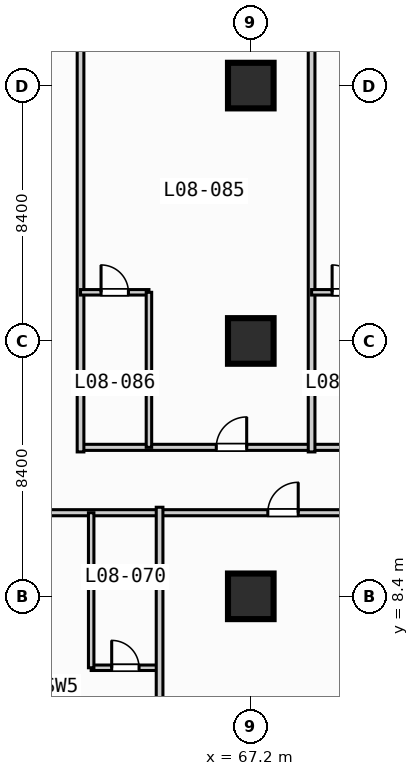
"""IFC4 building model, lengths in metres.
Left out: names, types, materials, properties, quantities, classifications, styles, units other than length and angle.
Written with IfcOpenShell. Run it as: python <this file> out.ifc"""

import sys

from ifc_helpers import new_model, si_unit, direction, frame, frame_2d, origin, origin_2d, place, context, subcontext, project, spatial, rectangle, extrude, element, fill, save


model = new_model("IFC4")
c1 = context("Model", 3, precision=1e-05, world=origin(), true_north=direction((0.0, 1.0)))
c2 = subcontext(c1, "Body", "Model", "MODEL_VIEW")
j1 = project(units=[si_unit("LENGTHUNIT", "METRE"), si_unit("PLANEANGLEUNIT", "RADIAN")], contexts=[c1])
p1 = place(None, origin())
s1 = spatial("IfcSite", under=j1, at=p1, CompositionType="ELEMENT")
p2 = place(p1, origin())
s2 = spatial("IfcBuilding", under=s1, at=p2, CompositionType="ELEMENT")
p3 = place(p2, frame((0.0, 0.0, 39.6)))
s3 = spatial("IfcBuildingStorey", under=s2, at=p3, CompositionType="ELEMENT", Elevation=39.6)
for number, where, z_axis, x_axis in (
    (1, (67.2, 8.4, 0.0), (0.0, 0.0, 1.0), (1.0, 0.0, 0.0)),
    (2, (67.2, 16.8, 0.0), (0.0, 0.0, 1.0), (1.0, 0.0, 0.0)),
    (3, (67.2, 25.2, 0.0), (0.0, 0.0, 1.0), (1.0, 0.0, 0.0)),
):
    element("IfcColumn", number, at=place(p3, frame(where, z_axis=z_axis, x_axis=x_axis)), inside=s3, PredefinedType="COLUMN", context=c2, shape_type="SweptSolid", body=[
        extrude(rectangle(XDim=1.5, YDim=1.5, at=origin_2d()), origin(), (0.0, 0.0, 1.0), 3.8),
    ])
p4 = place(p3, frame((13.4, 11.15, 0.0), z_axis=(0.0, 0.0, 1.0), x_axis=(1.0, 0.0, 0.0)))
e4 = element("IfcWall", 4, at=p4, inside=s3, PredefinedType="PARTITIONING", context=c2, shape_type="SweptSolid", body=[
    extrude(rectangle(XDim=75.4, YDim=0.2, at=frame_2d((37.7, 0.0))), origin(), (0.0, 0.0, 1.0), 3.55),
])
p5 = place(p4, frame((6.065, 0.0, 0.0)))
e5 = element("IfcOpeningElement", 5, at=p5, cuts=e4, PredefinedType="OPENING", context=c2, shape_type="SweptSolid", body=[
    extrude(rectangle(XDim=1.0, YDim=2.15, at=frame_2d((0.5, 1.075))), frame((0.0, 0.11, 0.0), z_axis=(0.0, -1.0, 0.0), x_axis=(1.0, 0.0, 0.0)), (0.0, 0.0, 1.0), 0.22),
])
p6 = place(p4, frame((13.36, 0.0, 0.0)))
e6 = element("IfcOpeningElement", 6, at=p6, cuts=e4, PredefinedType="OPENING", context=c2, shape_type="SweptSolid", body=[
    extrude(rectangle(XDim=1.0, YDim=2.15, at=frame_2d((0.5, 1.075))), frame((0.0, 0.11, 0.0), z_axis=(0.0, -1.0, 0.0), x_axis=(1.0, 0.0, 0.0)), (0.0, 0.0, 1.0), 0.22),
])
p7 = place(p4, frame((21.785, 0.0, 0.0)))
e7 = element("IfcOpeningElement", 7, at=p7, cuts=e4, PredefinedType="OPENING", context=c2, shape_type="SweptSolid", body=[
    extrude(rectangle(XDim=1.0, YDim=2.15, at=frame_2d((0.5, 1.075))), frame((0.0, 0.11, 0.0), z_axis=(0.0, -1.0, 0.0), x_axis=(1.0, 0.0, 0.0)), (0.0, 0.0, 1.0), 0.22),
])
p8 = place(p4, frame((30.185, 0.0, 0.0)))
e8 = element("IfcOpeningElement", 8, at=p8, cuts=e4, PredefinedType="OPENING", context=c2, shape_type="SweptSolid", body=[
    extrude(rectangle(XDim=1.0, YDim=2.15, at=frame_2d((0.5, 1.075))), frame((0.0, 0.11, 0.0), z_axis=(0.0, -1.0, 0.0), x_axis=(1.0, 0.0, 0.0)), (0.0, 0.0, 1.0), 0.22),
])
p9 = place(p4, frame((41.76, 0.0, 0.0)))
e9 = element("IfcOpeningElement", 9, at=p9, cuts=e4, PredefinedType="OPENING", context=c2, shape_type="SweptSolid", body=[
    extrude(rectangle(XDim=1.0, YDim=2.15, at=frame_2d((0.5, 1.075))), frame((0.0, 0.11, 0.0), z_axis=(0.0, -1.0, 0.0), x_axis=(1.0, 0.0, 0.0)), (0.0, 0.0, 1.0), 0.22),
])
p10 = place(p4, frame((54.36, 0.0, 0.0)))
e10 = element("IfcOpeningElement", 10, at=p10, cuts=e4, PredefinedType="OPENING", context=c2, shape_type="SweptSolid", body=[
    extrude(rectangle(XDim=1.0, YDim=2.15, at=frame_2d((0.5, 1.075))), frame((0.0, 0.11, 0.0), z_axis=(0.0, -1.0, 0.0), x_axis=(1.0, 0.0, 0.0)), (0.0, 0.0, 1.0), 0.22),
])
p11 = place(p4, frame((63.785, 0.0, 0.0)))
e11 = element("IfcOpeningElement", 11, at=p11, cuts=e4, PredefinedType="OPENING", context=c2, shape_type="SweptSolid", body=[
    extrude(rectangle(XDim=1.0, YDim=2.15, at=frame_2d((0.5, 1.075))), frame((0.0, 0.11, 0.0), z_axis=(0.0, -1.0, 0.0), x_axis=(1.0, 0.0, 0.0)), (0.0, 0.0, 1.0), 0.22),
])
p12 = place(p4, frame((70.86, 0.0, 0.0)))
e12 = element("IfcOpeningElement", 12, at=p12, cuts=e4, PredefinedType="OPENING", context=c2, shape_type="SweptSolid", body=[
    extrude(rectangle(XDim=1.0, YDim=2.15, at=frame_2d((0.5, 1.075))), frame((0.0, 0.11, 0.0), z_axis=(0.0, -1.0, 0.0), x_axis=(1.0, 0.0, 0.0)), (0.0, 0.0, 1.0), 0.22),
])
p13 = place(p3, frame((61.95, 6.05, 0.0), z_axis=(0.0, 0.0, 1.0), x_axis=(1.0, 0.0, 0.0)))
e13 = element("IfcWall", 13, at=p13, inside=s3, PredefinedType="PLUMBINGWALL", context=c2, shape_type="SweptSolid", body=[
    extrude(rectangle(XDim=2.25, YDim=0.18, at=frame_2d((1.125, 0.0))), origin(), (0.0, 0.0, 1.0), 3.55),
])
p14 = place(p13, frame((0.675, 0.0, 0.0)))
e14 = element("IfcOpeningElement", 14, at=p14, cuts=e13, PredefinedType="OPENING", context=c2, shape_type="SweptSolid", body=[
    extrude(rectangle(XDim=0.9, YDim=2.1, at=frame_2d((0.45, 1.05))), frame((0.0, 0.1, 0.0), z_axis=(0.0, -1.0, 0.0), x_axis=(1.0, 0.0, 0.0)), (0.0, 0.0, 1.0), 0.2),
])
p15 = place(p3, frame((61.95, 6.05, 0.0), z_axis=(0.0, 0.0, 1.0), x_axis=(0.0, 1.0, 0.0)))
e15 = element("IfcWall", 15, at=p15, inside=s3, PredefinedType="PLUMBINGWALL", context=c2, shape_type="SweptSolid", body=[
    extrude(rectangle(XDim=5.1, YDim=0.18, at=frame_2d((2.55, 0.0))), origin(), (0.0, 0.0, 1.0), 3.55),
])
p16 = place(p3, frame((64.2, 0.2, 0.0), z_axis=(0.0, 0.0, 1.0), x_axis=(0.0, 1.0, 0.0)))
e16 = element("IfcWall", 16, at=p16, inside=s3, PredefinedType="PARTITIONING", context=c2, shape_type="SweptSolid", body=[
    extrude(rectangle(XDim=11.13, YDim=0.22, at=frame_2d((5.565, 0.0))), origin(), (0.0, 0.0, 1.0), 3.55),
])
p17 = place(p3, frame((61.6, 13.3, 0.0), z_axis=(0.0, 0.0, 1.0), x_axis=(1.0, 0.0, 0.0)))
e17 = element("IfcWall", 17, at=p17, inside=s3, PredefinedType="PARTITIONING", context=c2, shape_type="SweptSolid", body=[
    extrude(rectangle(XDim=27.2, YDim=0.2, at=frame_2d((13.6, 0.0))), origin(), (0.0, 0.0, 1.0), 3.55),
])
p18 = place(p17, frame((4.465, 0.0, 0.0)))
e18 = element("IfcOpeningElement", 18, at=p18, cuts=e17, PredefinedType="OPENING", context=c2, shape_type="SweptSolid", body=[
    extrude(rectangle(XDim=1.0, YDim=2.15, at=frame_2d((0.5, 1.075))), frame((0.0, 0.11, 0.0), z_axis=(0.0, -1.0, 0.0), x_axis=(1.0, 0.0, 0.0)), (0.0, 0.0, 1.0), 0.22),
])
p19 = place(p17, frame((11.465, 0.0, 0.0)))
e19 = element("IfcOpeningElement", 19, at=p19, cuts=e17, PredefinedType="OPENING", context=c2, shape_type="SweptSolid", body=[
    extrude(rectangle(XDim=1.0, YDim=2.15, at=frame_2d((0.5, 1.075))), frame((0.0, 0.11, 0.0), z_axis=(0.0, -1.0, 0.0), x_axis=(1.0, 0.0, 0.0)), (0.0, 0.0, 1.0), 0.22),
])
p20 = place(p17, frame((15.535, 0.0, 0.0)))
e20 = element("IfcOpeningElement", 20, at=p20, cuts=e17, PredefinedType="OPENING", context=c2, shape_type="SweptSolid", body=[
    extrude(rectangle(XDim=1.0, YDim=2.15, at=frame_2d((0.5, 1.075))), frame((0.0, 0.11, 0.0), z_axis=(0.0, -1.0, 0.0), x_axis=(1.0, 0.0, 0.0)), (0.0, 0.0, 1.0), 0.22),
])
p21 = place(p17, frame((22.135, 0.0, 0.0)))
e21 = element("IfcOpeningElement", 21, at=p21, cuts=e17, PredefinedType="OPENING", context=c2, shape_type="SweptSolid", body=[
    extrude(rectangle(XDim=1.0, YDim=2.15, at=frame_2d((0.5, 1.075))), frame((0.0, 0.11, 0.0), z_axis=(0.0, -1.0, 0.0), x_axis=(1.0, 0.0, 0.0)), (0.0, 0.0, 1.0), 0.22),
])
p22 = place(p3, frame((61.6, 13.15, 0.0), z_axis=(0.0, 0.0, 1.0), x_axis=(0.0, 1.0, 0.0)))
e22 = element("IfcWall", 22, at=p22, inside=s3, PredefinedType="PARTITIONING", context=c2, shape_type="SweptSolid", body=[
    extrude(rectangle(XDim=20.28, YDim=0.22, at=frame_2d((10.14, 0.0))), origin(), (0.0, 0.0, 1.0), 3.55),
])
p23 = place(p3, frame((61.6, 18.4, 0.0), z_axis=(0.0, 0.0, 1.0), x_axis=(1.0, 0.0, 0.0)))
e23 = element("IfcWall", 23, at=p23, inside=s3, PredefinedType="PLUMBINGWALL", context=c2, shape_type="SweptSolid", body=[
    extrude(rectangle(XDim=2.25, YDim=0.18, at=frame_2d((1.125, 0.0))), origin(), (0.0, 0.0, 1.0), 3.55),
])
p24 = place(p23, frame((0.675, 0.0, 0.0)))
e24 = element("IfcOpeningElement", 24, at=p24, cuts=e23, PredefinedType="OPENING", context=c2, shape_type="SweptSolid", body=[
    extrude(rectangle(XDim=0.9, YDim=2.1, at=frame_2d((0.45, 1.05))), frame((0.0, 0.1, 0.0), z_axis=(0.0, -1.0, 0.0), x_axis=(1.0, 0.0, 0.0)), (0.0, 0.0, 1.0), 0.2),
])
p25 = place(p3, frame((63.85, 13.3, 0.0), z_axis=(0.0, 0.0, 1.0), x_axis=(0.0, 1.0, 0.0)))
e25 = element("IfcWall", 25, at=p25, inside=s3, PredefinedType="PLUMBINGWALL", context=c2, shape_type="SweptSolid", body=[
    extrude(rectangle(XDim=5.1, YDim=0.18, at=frame_2d((2.55, 0.0))), origin(), (0.0, 0.0, 1.0), 3.55),
])
p26 = place(p3, frame((69.2, 13.15, 0.0), z_axis=(0.0, 0.0, 1.0), x_axis=(0.0, 1.0, 0.0)))
e26 = element("IfcWall", 26, at=p26, inside=s3, PredefinedType="PARTITIONING", context=c2, shape_type="SweptSolid", body=[
    extrude(rectangle(XDim=20.28, YDim=0.22, at=frame_2d((10.14, 0.0))), origin(), (0.0, 0.0, 1.0), 3.55),
])
p27 = place(p3, frame((69.2, 18.4, 0.0), z_axis=(0.0, 0.0, 1.0), x_axis=(1.0, 0.0, 0.0)))
e27 = element("IfcWall", 27, at=p27, inside=s3, PredefinedType="PLUMBINGWALL", context=c2, shape_type="SweptSolid", body=[
    extrude(rectangle(XDim=2.25, YDim=0.18, at=frame_2d((1.125, 0.0))), origin(), (0.0, 0.0, 1.0), 3.55),
])
p28 = place(p27, frame((0.675, 0.0, 0.0)))
e28 = element("IfcOpeningElement", 28, at=p28, cuts=e27, PredefinedType="OPENING", context=c2, shape_type="SweptSolid", body=[
    extrude(rectangle(XDim=0.9, YDim=2.1, at=frame_2d((0.45, 1.05))), frame((0.0, 0.1, 0.0), z_axis=(0.0, -1.0, 0.0), x_axis=(1.0, 0.0, 0.0)), (0.0, 0.0, 1.0), 0.2),
])
p29 = place(p10, origin())
e29 = element("IfcDoor", 29, at=p29, inside=s3, OperationType="SINGLE_SWING_RIGHT", PredefinedType="DOOR", context=c2, shape_type="SweptSolid", body=[
    extrude(rectangle(XDim=1.0, YDim=2.15, at=frame_2d((0.5, 1.075))), frame((0.0, 0.025, 0.0), z_axis=(0.0, -1.0, 0.0), x_axis=(1.0, 0.0, 0.0)), (0.0, 0.0, 1.0), 0.05),
])
fill(e10, e29)
p30 = place(p14, origin())
e30 = element("IfcDoor", 30, at=p30, inside=s3, OperationType="SINGLE_SWING_LEFT", PredefinedType="DOOR", context=c2, shape_type="SweptSolid", body=[
    extrude(rectangle(XDim=0.9, YDim=2.1, at=frame_2d((0.45, 1.05))), frame((0.0, 0.025, 0.0), z_axis=(0.0, -1.0, 0.0), x_axis=(1.0, 0.0, 0.0)), (0.0, 0.0, 1.0), 0.05),
])
fill(e14, e30)
p31 = place(p18, origin())
e31 = element("IfcDoor", 31, at=p31, inside=s3, OperationType="SINGLE_SWING_RIGHT", PredefinedType="DOOR", context=c2, shape_type="SweptSolid", body=[
    extrude(rectangle(XDim=1.0, YDim=2.15, at=frame_2d((0.5, 1.075))), frame((0.0, 0.025, 0.0), z_axis=(0.0, -1.0, 0.0), x_axis=(1.0, 0.0, 0.0)), (0.0, 0.0, 1.0), 0.05),
])
fill(e18, e31)
p32 = place(p24, origin())
e32 = element("IfcDoor", 32, at=p32, inside=s3, OperationType="SINGLE_SWING_LEFT", PredefinedType="DOOR", context=c2, shape_type="SweptSolid", body=[
    extrude(rectangle(XDim=0.9, YDim=2.1, at=frame_2d((0.45, 1.05))), frame((0.0, 0.025, 0.0), z_axis=(0.0, -1.0, 0.0), x_axis=(1.0, 0.0, 0.0)), (0.0, 0.0, 1.0), 0.05),
])
fill(e24, e32)
p33 = place(p28, origin())
e33 = element("IfcDoor", 33, at=p33, inside=s3, OperationType="SINGLE_SWING_LEFT", PredefinedType="DOOR", context=c2, shape_type="SweptSolid", body=[
    extrude(rectangle(XDim=0.9, YDim=2.1, at=frame_2d((0.45, 1.05))), frame((0.0, 0.025, 0.0), z_axis=(0.0, -1.0, 0.0), x_axis=(1.0, 0.0, 0.0)), (0.0, 0.0, 1.0), 0.05),
])
fill(e28, e33)
save(model, sys.argv[1])
